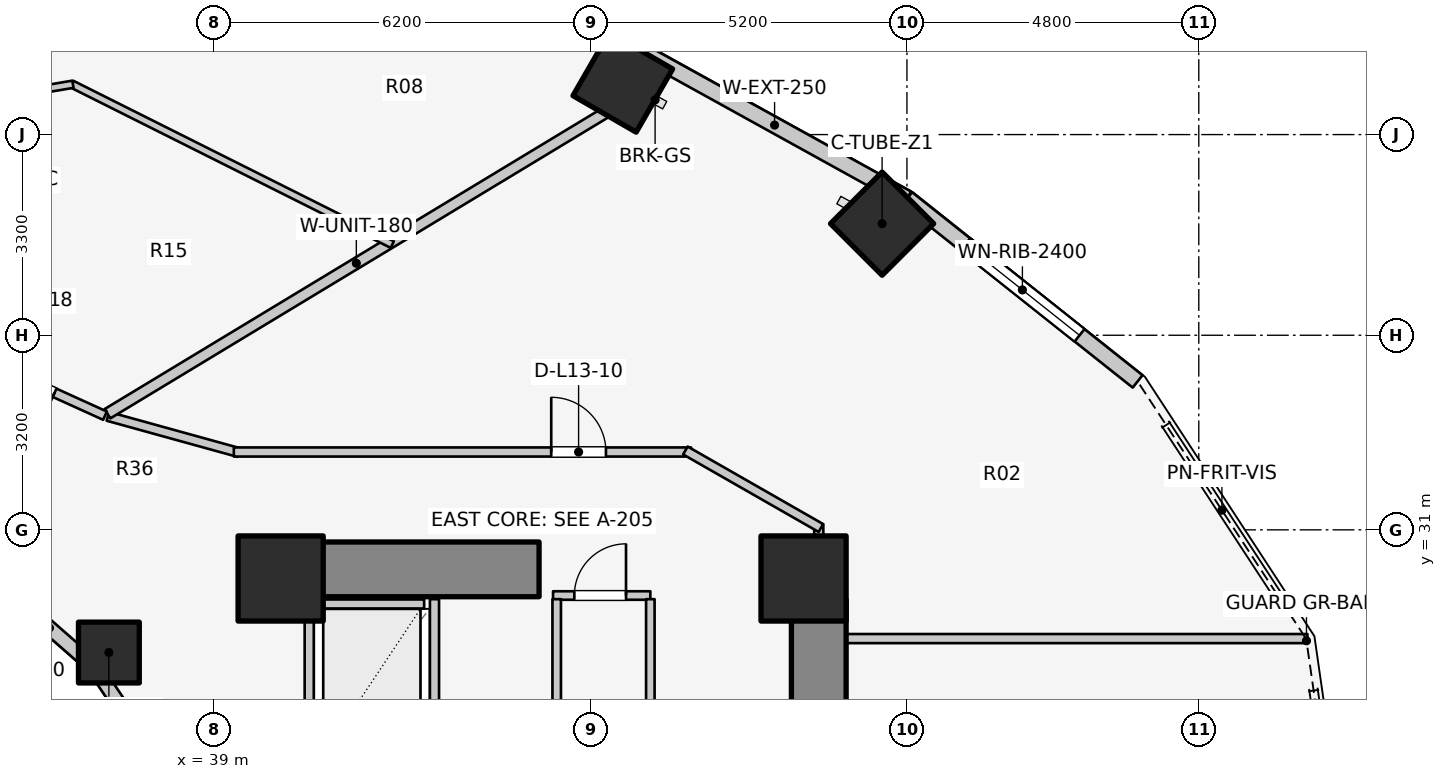
"""IFC4 building model, lengths in metres.
Left out: names, types, materials, properties, quantities, classifications, styles, units other than length and angle.
Written with IfcOpenShell. Run it as: python <this file> out.ifc"""

import sys

from ifc_helpers import new_model, si_unit, direction, frame, frame_2d, origin, origin_2d, place, context, subcontext, project, spatial, rectangle, extrude, element, fill, save


model = new_model("IFC4")
c1 = context("Model", 3, precision=1e-05, world=origin(), true_north=direction((0.0, 1.0)))
c2 = subcontext(c1, "Body", "Model", "MODEL_VIEW")
j1 = project(units=[si_unit("LENGTHUNIT", "METRE"), si_unit("PLANEANGLEUNIT", "RADIAN")], contexts=[c1])
p1 = place(None, origin())
s1 = spatial("IfcSite", under=j1, at=p1, CompositionType="ELEMENT")
p2 = place(p1, origin())
s2 = spatial("IfcBuilding", under=s1, at=p2, CompositionType="ELEMENT")
p3 = place(p2, frame((0.0, 0.0, 46.2)))
s3 = spatial("IfcBuildingStorey", under=s2, at=p3, CompositionType="ELEMENT", Elevation=46.2)
p4 = place(p3, frame((48.95, 17.05, 0.0), z_axis=(0.0, 0.0, 1.0), x_axis=(0.0, 1.0, 0.0)))
e1 = element("IfcWall", 1, at=p4, inside=s3, PredefinedType="SHEAR", context=c2, shape_type="SweptSolid", body=[
    extrude(rectangle(XDim=12.8, YDim=0.9, at=frame_2d((6.4, 0.0))), origin(), (0.0, 0.0, 1.0), 3.1),
])
p5 = place(p3, frame((39.85, 30.35, 0.0), z_axis=(0.0, 0.0, 1.0), x_axis=(1.0, 0.0, 0.0)))
e2 = element("IfcWall", 2, at=p5, inside=s3, PredefinedType="SHEAR", context=c2, shape_type="SweptSolid", body=[
    extrude(rectangle(XDim=4.5, YDim=0.9, at=frame_2d((2.25, 0.0))), origin(), (0.0, 0.0, 1.0), 3.1),
])
for number, where, z_axis, x_axis in (
    (3, (48.7, 30.2, 0.0), (0.0, 0.0, 1.0), (1.0, 0.0, 0.0)),
    (4, (40.1, 30.2, 0.0), (0.0, 0.0, 1.0), (1.0, 0.0, 0.0)),
):
    element("IfcColumn", number, at=place(p3, frame(where, z_axis=z_axis, x_axis=x_axis)), inside=s3, PredefinedType="COLUMN", context=c2, shape_type="SweptSolid", body=[
        extrude(rectangle(XDim=1.4, YDim=1.4, at=origin_2d()), origin(), (0.0, 0.0, 1.0), 3.1),
    ])
p6 = place(p3, frame((37.275, 28.982, 0.0), z_axis=(0.0, 0.0, 1.0), x_axis=(1.0, 0.0, 0.0)))
e5 = element("IfcColumn", 5, at=p6, inside=s3, PredefinedType="COLUMN", context=c2, shape_type="SweptSolid", body=[
    extrude(rectangle(XDim=1.0, YDim=1.0, at=origin_2d()), origin(), (0.0, 0.0, 1.0), 3.1),
])
for number, where, z_axis, x_axis in (
    (6, (49.992, 36.035, 0.0), (0.0, 0.0, 1.0), (0.707, 0.707, 0.0)),
    (7, (45.727, 38.359, 0.0), (0.0, 0.0, 1.0), (0.5, 0.866, 0.0)),
):
    element("IfcColumn", number, at=place(p3, frame(where, z_axis=z_axis, x_axis=x_axis)), inside=s3, PredefinedType="COLUMN", context=c2, shape_type="SweptSolid", body=[
        extrude(rectangle(XDim=1.2, YDim=1.2, at=origin_2d()), origin(), (0.0, 0.0, 1.0), 3.1),
    ])
p7 = place(p3, frame((38.166, 27.06, 0.0), z_axis=(0.0, 0.0, 1.0), x_axis=(-0.558197800898, 0.829707909492, 0.0)))
e8 = element("IfcWall", 8, at=p7, inside=s3, PredefinedType="STANDARD", context=c2, shape_type="SweptSolid", body=[
    extrude(rectangle(XDim=2.027, YDim=0.23, at=frame_2d((1.013, 0.0))), origin(), (0.0, 0.0, 1.0), 2.16),
])
p8 = place(p3, frame((37.035, 28.742, 0.0), z_axis=(0.0, 0.0, 1.0), x_axis=(-0.752576694707, 0.658504607869, 0.0)))
e9 = element("IfcWall", 9, at=p8, inside=s3, PredefinedType="STANDARD", context=c2, shape_type="SweptSolid", body=[
    extrude(rectangle(XDim=1.959, YDim=0.23, at=frame_2d((0.98, 0.0))), origin(), (0.0, 0.0, 1.0), 2.16),
])
p9 = place(p3, frame((54.194, 33.441, 0.0), z_axis=(0.0, 0.0, 1.0), x_axis=(-0.783123133379, 0.621866672179, 0.0)))
e10 = element("IfcWall", 10, at=p9, inside=s3, PredefinedType="STANDARD", context=c2, shape_type="SweptSolid", body=[
    extrude(rectangle(XDim=4.839, YDim=0.26, at=frame_2d((2.419, 0.0))), origin(), (0.0, 0.0, 1.0), 2.85),
])
p10 = place(p9, frame((1.219, 0.0, 0.75)))
e11 = element("IfcOpeningElement", 11, at=p10, cuts=e10, PredefinedType="OPENING", context=c2, shape_type="SweptSolid", body=[
    extrude(rectangle(XDim=2.4, YDim=1.7, at=frame_2d((1.2, 0.85))), frame((0.0, 0.14, 0.0), z_axis=(0.0, -1.0, 0.0), x_axis=(1.0, 0.0, 0.0)), (0.0, 0.0, 1.0), 0.28),
])
p11 = place(p3, frame((50.405, 36.45, 0.0), z_axis=(0.0, 0.0, 1.0), x_axis=(-0.875137303239, 0.483874674352, 0.0)))
e12 = element("IfcWall", 12, at=p11, inside=s3, PredefinedType="STANDARD", context=c2, shape_type="SweptSolid", body=[
    extrude(rectangle(XDim=4.985, YDim=0.26, at=frame_2d((2.493, 0.0))), origin(), (0.0, 0.0, 1.0), 2.85),
])
p12 = place(p3, frame((46.042, 38.862, 0.0), z_axis=(0.0, 0.0, 1.0), x_axis=(-0.958843593522, 0.283934786811, 0.0)))
e13 = element("IfcWall", 13, at=p12, inside=s3, PredefinedType="STANDARD", context=c2, shape_type="SweptSolid", body=[
    extrude(rectangle(XDim=5.955, YDim=0.26, at=frame_2d((2.978, 0.0))), origin(), (0.0, 0.0, 1.0), 2.85),
])
p13 = place(p12, frame((2.228, 0.0, 0.75)))
e14 = element("IfcOpeningElement", 14, at=p13, cuts=e13, PredefinedType="OPENING", context=c2, shape_type="SweptSolid", body=[
    extrude(rectangle(XDim=1.5, YDim=1.6, at=frame_2d((0.75, 0.8))), frame((0.0, 0.14, 0.0), z_axis=(0.0, -1.0, 0.0), x_axis=(1.0, 0.0, 0.0)), (0.0, 0.0, 1.0), 0.28),
])
p14 = place(p3, frame((40.74, 29.78, 0.0), z_axis=(0.0, 0.0, 1.0), x_axis=(1.0, 0.0, 0.0)))
e15 = element("IfcWall", 15, at=p14, inside=s3, PredefinedType="SOLIDWALL", context=c2, shape_type="SweptSolid", body=[
    extrude(rectangle(XDim=1.72, YDim=0.15, at=frame_2d((0.86, 0.0))), origin(), (0.0, 0.0, 1.0), 2.855),
])
for number, where, z_axis, x_axis in (
    (16, (40.57, 27.14, 0.0), (0.0, 0.0, 1.0), (0.0, 1.0, 0.0)),
    (17, (42.63, 27.14, 0.0), (0.0, 0.0, 1.0), (0.0, 1.0, 0.0)),
):
    element("IfcWall", number, at=place(p3, frame(where, z_axis=z_axis, x_axis=x_axis)), inside=s3, PredefinedType="SOLIDWALL", context=c2, shape_type="SweptSolid", body=[
        extrude(rectangle(XDim=2.72, YDim=0.15, at=frame_2d((1.36, 0.0))), origin(), (0.0, 0.0, 1.0), 2.855),
    ])
p15 = place(p3, frame((44.58, 29.92, 0.0), z_axis=(0.0, 0.0, 1.0), x_axis=(1.0, 0.0, 0.0)))
e18 = element("IfcWall", 18, at=p15, inside=s3, PredefinedType="PLUMBINGWALL", context=c2, shape_type="SweptSolid", body=[
    extrude(rectangle(XDim=1.6, YDim=0.14, at=frame_2d((0.8, 0.0))), origin(), (0.0, 0.0, 1.0), 2.855),
])
p16 = place(p15, frame((0.35, 0.0, 0.0)))
e19 = element("IfcOpeningElement", 19, at=p16, cuts=e18, PredefinedType="OPENING", context=c2, shape_type="SweptSolid", body=[
    extrude(rectangle(XDim=0.85, YDim=2.05, at=frame_2d((0.425, 1.025))), frame((0.0, 0.08, 0.0), z_axis=(0.0, -1.0, 0.0), x_axis=(1.0, 0.0, 0.0)), (0.0, 0.0, 1.0), 0.16),
])
for number, where, z_axis, x_axis in (
    (20, (44.64, 25.98, 0.0), (0.0, 0.0, 1.0), (0.0, 1.0, 0.0)),
    (21, (46.18, 25.98, 0.0), (0.0, 0.0, 1.0), (0.0, 1.0, 0.0)),
):
    element("IfcWall", number, at=place(p3, frame(where, z_axis=z_axis, x_axis=x_axis)), inside=s3, PredefinedType="PLUMBINGWALL", context=c2, shape_type="SweptSolid", body=[
        extrude(rectangle(XDim=3.88, YDim=0.14, at=frame_2d((1.94, 0.0))), origin(), (0.0, 0.0, 1.0), 2.855),
    ])
p17 = place(p3, frame((48.95, 29.212, 0.0), z_axis=(0.0, 0.0, 1.0), x_axis=(1.0, 0.0, 0.0)))
e22 = element("IfcWall", 22, at=p17, inside=s3, PredefinedType="PARTITIONING", context=c2, shape_type="SweptSolid", body=[
    extrude(rectangle(XDim=8.036, YDim=0.15, at=frame_2d((4.018, 0.0))), origin(), (0.0, 0.0, 1.0), 2.855),
])
p18 = place(p3, frame((48.95, 29.8, 0.0), z_axis=(0.0, 0.0, 1.0), x_axis=(0.0, 1.0, 0.0)))
e23 = element("IfcWall", 23, at=p18, inside=s3, PredefinedType="PARTITIONING", context=c2, shape_type="SweptSolid", body=[
    extrude(rectangle(XDim=1.29, YDim=0.15, at=frame_2d((0.645, 0.0))), origin(), (0.0, 0.0, 1.0), 2.069),
])
p19 = place(p3, frame((37.258, 32.867, 0.0), z_axis=(0.0, 0.0, 1.0), x_axis=(0.963833843713, -0.266503886865, 0.0)))
e24 = element("IfcWall", 24, at=p19, inside=s3, PredefinedType="PARTITIONING", context=c2, shape_type="SweptSolid", body=[
    extrude(rectangle(XDim=2.232, YDim=0.15, at=frame_2d((1.116, 0.0))), origin(), (0.0, 0.0, 1.0), 2.237),
])
p20 = place(p3, frame((39.33, 32.28, 0.0), z_axis=(0.0, 0.0, 1.0), x_axis=(1.0, 0.0, 0.0)))
e25 = element("IfcWall", 25, at=p20, inside=s3, PredefinedType="PARTITIONING", context=c2, shape_type="SweptSolid", body=[
    extrude(rectangle(XDim=7.52, YDim=0.15, at=frame_2d((3.76, 0.0))), origin(), (0.0, 0.0, 1.0), 2.237),
])
p21 = place(p20, frame((5.22, 0.0, 0.0)))
e26 = element("IfcOpeningElement", 26, at=p21, cuts=e25, PredefinedType="OPENING", context=c2, shape_type="SweptSolid", body=[
    extrude(rectangle(XDim=0.9, YDim=2.1, at=frame_2d((0.45, 1.05))), frame((0.0, 0.085, 0.0), z_axis=(0.0, -1.0, 0.0), x_axis=(1.0, 0.0, 0.0)), (0.0, 0.0, 1.0), 0.17),
])
p22 = place(p3, frame((46.757, 32.305, 0.0), z_axis=(0.0, 0.0, 1.0), x_axis=(0.867991349648, -0.496579315857, 0.0)))
e27 = element("IfcWall", 27, at=p22, inside=s3, PredefinedType="PARTITIONING", context=c2, shape_type="SweptSolid", body=[
    extrude(rectangle(XDim=2.567, YDim=0.15, at=frame_2d((1.283, 0.0))), origin(), (0.0, 0.0, 1.0), 2.069),
])
p23 = place(p3, frame((37.252, 32.91, 0.0), z_axis=(0.0, 0.0, 1.0), x_axis=(0.855817136021, 0.517278483694, 0.0)))
e28 = element("IfcWall", 28, at=p23, inside=s3, PredefinedType="PARTITIONING", context=c2, shape_type="SweptSolid", body=[
    extrude(rectangle(XDim=9.564, YDim=0.18, at=frame_2d((4.782, 0.0))), origin(), (0.0, 0.0, 1.0), 2.237),
])
p24 = place(p3, frame((41.936, 35.691, 0.0), z_axis=(0.0, 0.0, 1.0), x_axis=(-0.894128783551, 0.447809913274, 0.0)))
e29 = element("IfcWall", 29, at=p24, inside=s3, PredefinedType="MOVABLE", context=c2, shape_type="SweptSolid", body=[
    extrude(rectangle(XDim=5.895, YDim=0.12, at=frame_2d((2.947, 0.0))), origin(), (0.0, 0.0, 1.0), 2.237),
])
p25 = place(p3, frame((36.684, 38.328, 0.0), z_axis=(0.0, 0.0, 1.0), x_axis=(-0.985971487104, -0.166913829921, 0.0)))
e30 = element("IfcWall", 30, at=p25, inside=s3, PredefinedType="MOVABLE", context=c2, shape_type="SweptSolid", body=[
    extrude(rectangle(XDim=4.801, YDim=0.12, at=frame_2d((2.4, 0.0))), origin(), (0.0, 0.0, 1.0), 2.237),
])
p26 = place(p25, frame((1.925, 0.0, 0.0)))
e31 = element("IfcOpeningElement", 31, at=p26, cuts=e30, PredefinedType="OPENING", context=c2, shape_type="SweptSolid", body=[
    extrude(rectangle(XDim=0.95, YDim=2.1, at=frame_2d((0.475, 1.05))), frame((0.0, 0.07, 0.0), z_axis=(0.0, -1.0, 0.0), x_axis=(1.0, 0.0, 0.0)), (0.0, 0.0, 1.0), 0.14),
])
p27 = place(p3, frame((37.211, 32.877, 0.0), z_axis=(0.0, 0.0, 1.0), x_axis=(-0.910568469686, 0.41335827319, 0.0)))
e32 = element("IfcWall", 32, at=p27, inside=s3, PredefinedType="PARTITIONING", context=c2, shape_type="SweptSolid", body=[
    extrude(rectangle(XDim=2.772, YDim=0.15, at=frame_2d((1.386, 0.0))), origin(), (0.0, 0.0, 1.0), 2.237),
])
p28 = place(p27, frame((0.911, 0.0, 0.0)))
e33 = element("IfcOpeningElement", 33, at=p28, cuts=e32, PredefinedType="OPENING", context=c2, shape_type="SweptSolid", body=[
    extrude(rectangle(XDim=0.95, YDim=2.1, at=frame_2d((0.475, 1.05))), frame((0.0, 0.085, 0.0), z_axis=(0.0, -1.0, 0.0), x_axis=(1.0, 0.0, 0.0)), (0.0, 0.0, 1.0), 0.17),
])
p29 = place(p10, origin())
e34 = element("IfcWindow", 34, at=p29, inside=s3, PartitioningType="SINGLE_PANEL", PredefinedType="WINDOW", context=c2, shape_type="SweptSolid", body=[
    extrude(rectangle(XDim=2.4, YDim=1.7, at=frame_2d((1.2, 0.85))), frame((0.0, 0.03, 0.0), z_axis=(0.0, -1.0, 0.0), x_axis=(1.0, 0.0, 0.0)), (0.0, 0.0, 1.0), 0.06),
])
fill(e11, e34)
p30 = place(p16, origin())
e35 = element("IfcDoor", 35, at=p30, inside=s3, OperationType="SINGLE_SWING_RIGHT", PredefinedType="DOOR", context=c2, shape_type="SweptSolid", body=[
    extrude(rectangle(XDim=0.85, YDim=2.05, at=frame_2d((0.425, 1.025))), frame((0.0, 0.025, 0.0), z_axis=(0.0, -1.0, 0.0), x_axis=(1.0, 0.0, 0.0)), (0.0, 0.0, 1.0), 0.05),
])
fill(e19, e35)
p31 = place(p21, origin())
e36 = element("IfcDoor", 36, at=p31, inside=s3, OperationType="SINGLE_SWING_LEFT", PredefinedType="DOOR", context=c2, shape_type="SweptSolid", body=[
    extrude(rectangle(XDim=0.9, YDim=2.1, at=frame_2d((0.45, 1.05))), frame((0.0, 0.025, 0.0), z_axis=(0.0, -1.0, 0.0), x_axis=(1.0, 0.0, 0.0)), (0.0, 0.0, 1.0), 0.05),
])
fill(e26, e36)
p32 = place(p28, origin())
e37 = element("IfcDoor", 37, at=p32, inside=s3, OperationType="SINGLE_SWING_LEFT", PredefinedType="DOOR", context=c2, shape_type="SweptSolid", body=[
    extrude(rectangle(XDim=0.95, YDim=2.1, at=frame_2d((0.475, 1.05))), frame((0.0, 0.025, 0.0), z_axis=(0.0, -1.0, 0.0), x_axis=(1.0, 0.0, 0.0)), (0.0, 0.0, 1.0), 0.05),
])
fill(e33, e37)
save(model, sys.argv[1])
